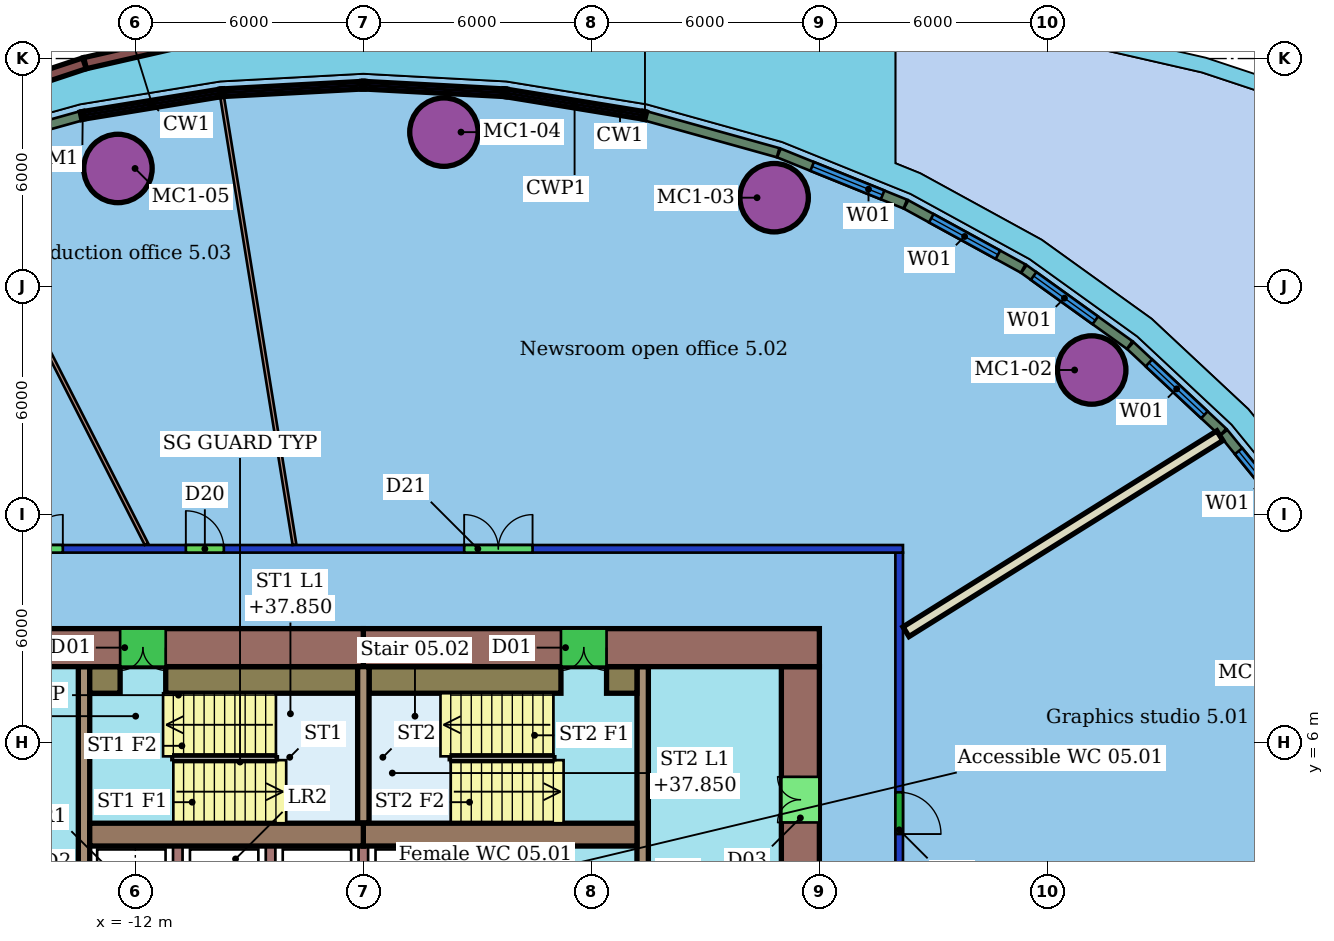
"""IFC4 building model, lengths in metres.
Left out: names, types, materials, properties, quantities, classifications, styles, units other than length and angle.
Written with IfcOpenShell. Run it as: python <this file> out.ifc"""

import sys

from ifc_helpers import new_model, si_unit, direction, frame, frame_2d, origin, origin_2d, place, context, subcontext, project, spatial, rectangle, hollow_circle, extrude, element, fill, save


model = new_model("IFC4")
c1 = context("Model", 3, precision=1e-05, world=origin(), true_north=direction((0.0, 1.0)))
c2 = subcontext(c1, "Body", "Model", "MODEL_VIEW")
j1 = project(units=[si_unit("LENGTHUNIT", "METRE"), si_unit("PLANEANGLEUNIT", "RADIAN")], contexts=[c1])
p1 = place(None, origin())
s1 = spatial("IfcSite", under=j1, at=p1, CompositionType="ELEMENT")
p2 = place(p1, origin())
s2 = spatial("IfcBuilding", under=s1, at=p2, CompositionType="ELEMENT")
p3 = place(p2, frame((0.0, 0.0, 36.0)))
s3 = spatial("IfcBuildingStorey", under=s2, at=p3, CompositionType="ELEMENT", Elevation=36.0)
for number, where, z_axis, x_axis in (
    (1, (13.166, 15.805, 0.0), (0.0, 0.0, 1.0), (1.0, 0.0, 0.0)),
    (2, (4.81, 20.339, 0.0), (0.0, 0.0, 1.0), (1.0, 0.0, 0.0)),
    (3, (-3.879, 22.064, 0.0), (0.0, 0.0, 1.0), (1.0, 0.0, 0.0)),
    (4, (-12.458, 21.108, 0.0), (0.0, 0.0, 1.0), (1.0, 0.0, 0.0)),
):
    element("IfcColumn", number, at=place(p3, frame(where, z_axis=z_axis, x_axis=x_axis)), inside=s3, PredefinedType="COLUMN", context=c2, shape_type="SweptSolid", body=[
        extrude(hollow_circle(Radius=0.9, WallThickness=0.06, at=origin_2d()), origin(), (0.0, 0.0, 1.0), 3.55),
    ])
p4 = place(p3, frame((-20.2, 11.1, 0.0), z_axis=(0.0, 0.0, 1.0), x_axis=(1.0, 0.0, 0.0)))
e5 = element("IfcWall", 5, at=p4, inside=s3, PredefinedType="PARTITIONING", context=c2, shape_type="SweptSolid", body=[
    extrude(rectangle(XDim=28.4, YDim=0.2, at=frame_2d((14.2, 0.0))), origin(), (0.0, 0.0, 1.0), 2.85),
])
p5 = place(p4, frame((16.853, 0.0, 0.0)))
e6 = element("IfcOpeningElement", 6, at=p5, cuts=e5, PredefinedType="OPENING", context=c2, shape_type="SweptSolid", body=[
    extrude(rectangle(XDim=1.8, YDim=2.1, at=frame_2d((0.9, 1.05))), frame((0.0, 0.11, 0.0), z_axis=(0.0, -1.0, 0.0), x_axis=(1.0, 0.0, 0.0)), (0.0, 0.0, 1.0), 0.22),
])
p6 = place(p4, frame((9.53, 0.0, 0.0)))
e7 = element("IfcOpeningElement", 7, at=p6, cuts=e5, PredefinedType="OPENING", context=c2, shape_type="SweptSolid", body=[
    extrude(rectangle(XDim=1.0, YDim=2.1, at=frame_2d((0.5, 1.05))), frame((0.0, 0.11, 0.0), z_axis=(0.0, -1.0, 0.0), x_axis=(1.0, 0.0, 0.0)), (0.0, 0.0, 1.0), 0.22),
])
p7 = place(p4, frame((4.492, 0.0, 0.0)))
e8 = element("IfcOpeningElement", 8, at=p7, cuts=e5, PredefinedType="OPENING", context=c2, shape_type="SweptSolid", body=[
    extrude(rectangle(XDim=1.8, YDim=2.1, at=frame_2d((0.9, 1.05))), frame((0.0, 0.11, 0.0), z_axis=(0.0, -1.0, 0.0), x_axis=(1.0, 0.0, 0.0)), (0.0, 0.0, 1.0), 0.22),
])
p8 = place(p3, frame((8.1, 11.0, 0.0), z_axis=(0.0, 0.0, 1.0), x_axis=(0.0, -1.0, 0.0)))
e9 = element("IfcWall", 9, at=p8, inside=s3, PredefinedType="PARTITIONING", context=c2, shape_type="SweptSolid", body=[
    extrude(rectangle(XDim=22.0, YDim=0.2, at=frame_2d((11.0, 0.0))), origin(), (0.0, 0.0, 1.0), 2.85),
])
p9 = place(p8, frame((6.305, 0.0, 0.0)))
e10 = element("IfcOpeningElement", 10, at=p9, cuts=e9, PredefinedType="OPENING", context=c2, shape_type="SweptSolid", body=[
    extrude(rectangle(XDim=1.1, YDim=2.1, at=frame_2d((0.55, 1.05))), frame((0.0, 0.11, 0.0), z_axis=(0.0, -1.0, 0.0), x_axis=(1.0, 0.0, 0.0)), (0.0, 0.0, 1.0), 0.22),
])
p10 = place(p8, frame((13.064, 0.0, 0.0)))
e11 = element("IfcOpeningElement", 11, at=p10, cuts=e9, PredefinedType="OPENING", context=c2, shape_type="SweptSolid", body=[
    extrude(rectangle(XDim=0.9, YDim=2.1, at=frame_2d((0.45, 1.05))), frame((0.0, 0.11, 0.0), z_axis=(0.0, -1.0, 0.0), x_axis=(1.0, 0.0, 0.0)), (0.0, 0.0, 1.0), 0.22),
])
p11 = place(p3, frame((22.134, 3.013, 0.0), z_axis=(0.0, 0.0, 1.0), x_axis=(-0.994314695198, -0.106481392334, 0.0)))
e12 = element("IfcWall", 12, at=p11, inside=s3, PredefinedType="PARTITIONING", context=c2, shape_type="SweptSolid", body=[
    extrude(rectangle(XDim=13.998, YDim=0.3, at=frame_2d((6.999, 0.0))), origin(), (0.0, 0.0, 1.0), 3.55),
])
p12 = place(p3, frame((16.538, 14.076, 0.0), z_axis=(0.0, 0.0, 1.0), x_axis=(-0.848172924514, -0.529719444726, 0.0)))
e13 = element("IfcWall", 13, at=p12, inside=s3, PredefinedType="PARTITIONING", context=c2, shape_type="SweptSolid", body=[
    extrude(rectangle(XDim=9.737, YDim=0.3, at=frame_2d((4.869, 0.0))), origin(), (0.0, 0.0, 1.0), 3.55),
])
p13 = place(p3, frame((-9.714, 22.976, 0.0), z_axis=(0.0, 0.0, 1.0), x_axis=(0.159567915993, -0.987186953006, 0.0)))
e14 = element("IfcWall", 14, at=p13, inside=s3, PredefinedType="PARTITIONING", context=c2, shape_type="SweptSolid", body=[
    extrude(rectangle(XDim=11.92, YDim=0.1, at=frame_2d((5.96, 0.0))), origin(), (0.0, 0.0, 1.0), 3.55),
])
p14 = place(p3, frame((-16.885, 21.401, 0.0), z_axis=(0.0, 0.0, 1.0), x_axis=(0.453334779339, -0.89134032661, 0.0)))
e15 = element("IfcWall", 15, at=p14, inside=s3, PredefinedType="PARTITIONING", context=c2, shape_type="SweptSolid", body=[
    extrude(rectangle(XDim=11.419, YDim=0.1, at=frame_2d((5.709, 0.0))), origin(), (0.0, 0.0, 1.0), 3.55),
])
p15 = place(p3, frame((18.688, 11.637, 0.0), z_axis=(0.0, 0.0, 1.0), x_axis=(-0.631970989947, 0.774992043743, 0.0)))
e16 = element("IfcWall", 16, at=p15, inside=s3, PredefinedType="SOLIDWALL", context=c2, shape_type="SweptSolid", body=[
    extrude(rectangle(XDim=3.245, YDim=0.25, at=frame_2d((1.623, 0.0))), origin(), (0.0, 0.0, 1.0), 3.15),
])
p16 = place(p15, frame((0.623, 0.0, 0.8)))
e17 = element("IfcOpeningElement", 17, at=p16, cuts=e16, PredefinedType="OPENING", context=c2, shape_type="SweptSolid", body=[
    extrude(rectangle(XDim=2.0, YDim=2.2, at=frame_2d((1.0, 1.1))), frame((0.0, 0.135, 0.0), z_axis=(0.0, -1.0, 0.0), x_axis=(1.0, 0.0, 0.0)), (0.0, 0.0, 1.0), 0.27),
])
p17 = place(p3, frame((16.621, 14.17, 0.0), z_axis=(0.0, 0.0, 1.0), x_axis=(-0.730670592597, 0.682730170063, 0.0)))
e18 = element("IfcWall", 18, at=p17, inside=s3, PredefinedType="SOLIDWALL", context=c2, shape_type="SweptSolid", body=[
    extrude(rectangle(XDim=3.336, YDim=0.25, at=frame_2d((1.668, 0.0))), origin(), (0.0, 0.0, 1.0), 3.15),
])
p18 = place(p17, frame((0.668, 0.0, 0.8)))
e19 = element("IfcOpeningElement", 19, at=p18, cuts=e18, PredefinedType="OPENING", context=c2, shape_type="SweptSolid", body=[
    extrude(rectangle(XDim=2.0, YDim=2.2, at=frame_2d((1.0, 1.1))), frame((0.0, 0.135, 0.0), z_axis=(0.0, -1.0, 0.0), x_axis=(1.0, 0.0, 0.0)), (0.0, 0.0, 1.0), 0.27),
])
p19 = place(p3, frame((14.165, 16.463, 0.0), z_axis=(0.0, 0.0, 1.0), x_axis=(-0.812059685452, 0.5835743888, 0.0)))
e20 = element("IfcWall", 20, at=p19, inside=s3, PredefinedType="SOLIDWALL", context=c2, shape_type="SweptSolid", body=[
    extrude(rectangle(XDim=3.427, YDim=0.25, at=frame_2d((1.713, 0.0))), origin(), (0.0, 0.0, 1.0), 3.15),
])
p20 = place(p19, frame((1.113, 0.0, 0.8)))
e21 = element("IfcOpeningElement", 21, at=p20, cuts=e20, PredefinedType="OPENING", context=c2, shape_type="SweptSolid", body=[
    extrude(rectangle(XDim=2.0, YDim=2.2, at=frame_2d((1.0, 1.1))), frame((0.0, 0.135, 0.0), z_axis=(0.0, -1.0, 0.0), x_axis=(1.0, 0.0, 0.0)), (0.0, 0.0, 1.0), 0.27),
])
p21 = place(p3, frame((11.362, 18.475, 0.0), z_axis=(0.0, 0.0, 1.0), x_axis=(-0.8771213679, 0.480268785134, 0.0)))
e22 = element("IfcWall", 22, at=p21, inside=s3, PredefinedType="SOLIDWALL", context=c2, shape_type="SweptSolid", body=[
    extrude(rectangle(XDim=3.512, YDim=0.25, at=frame_2d((1.756, 0.0))), origin(), (0.0, 0.0, 1.0), 3.15),
])
p22 = place(p21, frame((0.756, 0.0, 0.8)))
e23 = element("IfcOpeningElement", 23, at=p22, cuts=e22, PredefinedType="OPENING", context=c2, shape_type="SweptSolid", body=[
    extrude(rectangle(XDim=2.0, YDim=2.2, at=frame_2d((1.0, 1.1))), frame((0.0, 0.135, 0.0), z_axis=(0.0, -1.0, 0.0), x_axis=(1.0, 0.0, 0.0)), (0.0, 0.0, 1.0), 0.27),
])
p23 = place(p3, frame((8.261, 20.171, 0.0), z_axis=(0.0, 0.0, 1.0), x_axis=(-0.927147291409, 0.374697077694, 0.0)))
e24 = element("IfcWall", 24, at=p23, inside=s3, PredefinedType="SOLIDWALL", context=c2, shape_type="SweptSolid", body=[
    extrude(rectangle(XDim=3.588, YDim=0.25, at=frame_2d((1.794, 0.0))), origin(), (0.0, 0.0, 1.0), 3.15),
])
p24 = place(p23, frame((0.644, 0.0, 0.8)))
e25 = element("IfcOpeningElement", 25, at=p24, cuts=e24, PredefinedType="OPENING", context=c2, shape_type="SweptSolid", body=[
    extrude(rectangle(XDim=2.0, YDim=2.2, at=frame_2d((1.0, 1.1))), frame((0.0, 0.135, 0.0), z_axis=(0.0, -1.0, 0.0), x_axis=(1.0, 0.0, 0.0)), (0.0, 0.0, 1.0), 0.27),
])
for number, where, z_axis, x_axis in (
    (26, (4.914, 21.522, 0.0), (0.0, 0.0, 1.0), (-0.963, 0.268, 0.0)),
    (27, (-13.443, 22.488, 0.0), (0.0, 0.0, 1.0), (-0.963, -0.268, 0.0)),
):
    element("IfcWall", number, at=place(p3, frame(where, z_axis=z_axis, x_axis=x_axis)), inside=s3, PredefinedType="SOLIDWALL", context=c2, shape_type="SweptSolid", body=[
        extrude(rectangle(XDim=3.604, YDim=0.25, at=frame_2d((1.802, 0.0))), origin(), (0.0, 0.0, 1.0), 3.15),
    ])
p25 = place(p3, frame((-8.57, 24.965, 0.0), z_axis=(0.0, 0.0, 1.0), x_axis=(-0.974849806662, -0.222862860186, 0.0)))
e28 = element("IfcWall", 28, at=p25, inside=s3, PredefinedType="PARAPET", context=c2, shape_type="SweptSolid", body=[
    extrude(rectangle(XDim=4.877, YDim=0.3, at=frame_2d((2.438, 0.0))), origin(), (0.0, 0.0, 1.0), 1.1),
])
p26 = place(p3, frame((-13.338, 23.875, 0.0), z_axis=(0.0, 0.0, 1.0), x_axis=(-0.949007114017, -0.315254655071, 0.0)))
e29 = element("IfcWall", 29, at=p26, inside=s3, PredefinedType="PARAPET", context=c2, shape_type="SweptSolid", body=[
    extrude(rectangle(XDim=4.743, YDim=0.3, at=frame_2d((2.371, 0.0))), origin(), (0.0, 0.0, 1.0), 1.1),
])
p27 = place(p3, frame((6.0, 8.5, 0.0), z_axis=(0.0, 0.0, 1.0), x_axis=(-1.0, 0.0, 0.0)))
e30 = element("IfcWall", 30, at=p27, inside=s3, PredefinedType="SHEAR", context=c2, shape_type="SweptSolid", body=[
    extrude(rectangle(XDim=12.0, YDim=1.0, at=frame_2d((6.0, 0.0))), origin(), (0.0, 0.0, 1.0), 3.4),
])
p28 = place(p27, frame((5.6, 0.0, 0.0)))
e31 = element("IfcOpeningElement", 31, at=p28, cuts=e30, PredefinedType="OPENING", context=c2, shape_type="SweptSolid", body=[
    extrude(rectangle(XDim=1.2, YDim=2.1, at=frame_2d((0.6, 1.05))), frame((0.0, 0.51, 0.0), z_axis=(0.0, -1.0, 0.0), x_axis=(1.0, 0.0, 0.0)), (0.0, 0.0, 1.0), 1.02),
])
p29 = place(p3, frame((-6.0, 8.5, 0.0), z_axis=(0.0, 0.0, 1.0), x_axis=(-1.0, 0.0, 0.0)))
e32 = element("IfcWall", 32, at=p29, inside=s3, PredefinedType="SHEAR", context=c2, shape_type="SweptSolid", body=[
    extrude(rectangle(XDim=12.0, YDim=1.0, at=frame_2d((6.0, 0.0))), origin(), (0.0, 0.0, 1.0), 3.4),
])
p30 = place(p29, frame((5.2, 0.0, 0.0)))
e33 = element("IfcOpeningElement", 33, at=p30, cuts=e32, PredefinedType="OPENING", context=c2, shape_type="SweptSolid", body=[
    extrude(rectangle(XDim=1.2, YDim=2.1, at=frame_2d((0.6, 1.05))), frame((0.0, 0.51, 0.0), z_axis=(0.0, -1.0, 0.0), x_axis=(1.0, 0.0, 0.0)), (0.0, 0.0, 1.0), 1.02),
])
p31 = place(p3, frame((5.5, -8.0, 0.0), z_axis=(0.0, 0.0, 1.0), x_axis=(0.0, 1.0, 0.0)))
e34 = element("IfcWall", 34, at=p31, inside=s3, PredefinedType="SHEAR", context=c2, shape_type="SweptSolid", body=[
    extrude(rectangle(XDim=16.0, YDim=1.0, at=frame_2d((8.0, 0.0))), origin(), (0.0, 0.0, 1.0), 3.4),
])
p32 = place(p31, frame((2.9, 0.0, 0.0)))
e35 = element("IfcOpeningElement", 35, at=p32, cuts=e34, PredefinedType="OPENING", context=c2, shape_type="SweptSolid", body=[
    extrude(rectangle(XDim=1.2, YDim=2.1, at=frame_2d((0.6, 1.05))), frame((0.0, 0.51, 0.0), z_axis=(0.0, -1.0, 0.0), x_axis=(1.0, 0.0, 0.0)), (0.0, 0.0, 1.0), 1.02),
])
p33 = place(p31, frame((11.9, 0.0, 0.0)))
e36 = element("IfcOpeningElement", 36, at=p33, cuts=e34, PredefinedType="OPENING", context=c2, shape_type="SweptSolid", body=[
    extrude(rectangle(XDim=1.2, YDim=2.1, at=frame_2d((0.6, 1.05))), frame((0.0, 0.51, 0.0), z_axis=(0.0, -1.0, 0.0), x_axis=(1.0, 0.0, 0.0)), (0.0, 0.0, 1.0), 1.02),
])
for number, where, z_axis, x_axis in (
    (37, (-13.2, 3.58, 0.0), (0.0, 0.0, 1.0), (1.0, 0.0, 0.0)),
    (38, (-6.0, 3.58, 0.0), (0.0, 0.0, 1.0), (1.0, 0.0, 0.0)),
):
    element("IfcWall", number, at=place(p3, frame(where, z_axis=z_axis, x_axis=x_axis)), inside=s3, PredefinedType="SHEAR", context=c2, shape_type="SweptSolid", body=[
        extrude(rectangle(XDim=7.2, YDim=0.6, at=frame_2d((3.6, 0.0))), origin(), (0.0, 0.0, 1.0), 3.4),
    ])
p34 = place(p3, frame((-13.35, 8.0, 0.0), z_axis=(0.0, 0.0, 1.0), x_axis=(0.0, -1.0, 0.0)))
e39 = element("IfcWall", 39, at=p34, inside=s3, PredefinedType="SHEAR", context=c2, shape_type="SweptSolid", body=[
    extrude(rectangle(XDim=16.0, YDim=0.3, at=frame_2d((8.0, 0.0))), origin(), (0.0, 0.0, 1.0), 3.4),
])
p35 = place(p34, frame((7.25, 0.0, 0.0)))
e40 = element("IfcOpeningElement", 40, at=p35, cuts=e39, PredefinedType="OPENING", context=c2, shape_type="SweptSolid", body=[
    extrude(rectangle(XDim=1.5, YDim=2.1, at=frame_2d((0.75, 1.05))), frame((0.0, 0.16, 0.0), z_axis=(0.0, -1.0, 0.0), x_axis=(1.0, 0.0, 0.0)), (0.0, 0.0, 1.0), 0.32),
])
p36 = place(p3, frame((1.35, -8.0, 0.0), z_axis=(0.0, 0.0, 1.0), x_axis=(0.0, 1.0, 0.0)))
e41 = element("IfcWall", 41, at=p36, inside=s3, PredefinedType="SHEAR", context=c2, shape_type="SweptSolid", body=[
    extrude(rectangle(XDim=16.0, YDim=0.3, at=frame_2d((8.0, 0.0))), origin(), (0.0, 0.0, 1.0), 3.4),
])
p37 = place(p36, frame((1.91, 0.0, 0.0)))
e42 = element("IfcOpeningElement", 42, at=p37, cuts=e41, PredefinedType="OPENING", context=c2, shape_type="SweptSolid", body=[
    extrude(rectangle(XDim=1.0, YDim=2.1, at=frame_2d((0.5, 1.05))), frame((0.0, 0.16, 0.0), z_axis=(0.0, -1.0, 0.0), x_axis=(1.0, 0.0, 0.0)), (0.0, 0.0, 1.0), 0.32),
])
p38 = place(p36, frame((7.25, 0.0, 0.0)))
e43 = element("IfcOpeningElement", 43, at=p38, cuts=e41, PredefinedType="OPENING", context=c2, shape_type="SweptSolid", body=[
    extrude(rectangle(XDim=1.5, YDim=2.1, at=frame_2d((0.75, 1.05))), frame((0.0, 0.16, 0.0), z_axis=(0.0, -1.0, 0.0), x_axis=(1.0, 0.0, 0.0)), (0.0, 0.0, 1.0), 0.32),
])
p39 = place(p3, frame((-6.0, 3.88, 0.0), z_axis=(0.0, 0.0, 1.0), x_axis=(0.0, 1.0, 0.0)))
e44 = element("IfcWall", 44, at=p39, inside=s3, PredefinedType="SHEAR", context=c2, shape_type="SweptSolid", body=[
    extrude(rectangle(XDim=4.12, YDim=0.3, at=frame_2d((2.06, 0.0))), origin(), (0.0, 0.0, 1.0), 3.4),
])
p40 = place(p3, frame((-13.2, 7.65, 0.0), z_axis=(0.0, 0.0, 1.0), x_axis=(1.0, 0.0, 0.0)))
e45 = element("IfcWall", 45, at=p40, inside=s3, PredefinedType="SHEAR", context=c2, shape_type="SweptSolid", body=[
    extrude(rectangle(XDim=0.8, YDim=0.7, at=frame_2d((0.4, 0.0))), origin(), (0.0, 0.0, 1.0), 3.4),
])
for number, where, z_axis, x_axis in (
    (46, (-11.2, 7.65, 0.0), (0.0, 0.0, 1.0), (1.0, 0.0, 0.0)),
    (47, (-5.85, 7.65, 0.0), (0.0, 0.0, 1.0), (1.0, 0.0, 0.0)),
):
    element("IfcWall", number, at=place(p3, frame(where, z_axis=z_axis, x_axis=x_axis)), inside=s3, PredefinedType="SHEAR", context=c2, shape_type="SweptSolid", body=[
        extrude(rectangle(XDim=5.05, YDim=0.7, at=frame_2d((2.525, 0.0))), origin(), (0.0, 0.0, 1.0), 3.4),
    ])
p41 = place(p3, frame((0.4, 7.65, 0.0), z_axis=(0.0, 0.0, 1.0), x_axis=(1.0, 0.0, 0.0)))
e48 = element("IfcWall", 48, at=p41, inside=s3, PredefinedType="SHEAR", context=c2, shape_type="SweptSolid", body=[
    extrude(rectangle(XDim=0.8, YDim=0.7, at=frame_2d((0.4, 0.0))), origin(), (0.0, 0.0, 1.0), 3.4),
])
for number, where, z_axis, x_axis in (
    (49, (-10.883, 1.6, 0.0), (0.0, 0.0, 1.0), (0.0, 1.0, 0.0)),
    (50, (-8.442, 1.6, 0.0), (0.0, 0.0, 1.0), (0.0, 1.0, 0.0)),
    (51, (-6.0, 1.6, 0.0), (0.0, 0.0, 1.0), (0.0, 1.0, 0.0)),
    (52, (-3.558, 1.6, 0.0), (0.0, 0.0, 1.0), (0.0, 1.0, 0.0)),
):
    element("IfcWall", number, at=place(p3, frame(where, z_axis=z_axis, x_axis=x_axis)), inside=s3, PredefinedType="SHEAR", context=c2, shape_type="SweptSolid", body=[
        extrude(rectangle(XDim=1.68, YDim=0.25, at=frame_2d((0.84, 0.0))), origin(), (0.0, 0.0, 1.0), 3.4),
    ])
p42 = place(p3, frame((-1.765, 1.6, 0.0), z_axis=(0.0, 0.0, 1.0), x_axis=(0.0, 1.0, 0.0)))
e53 = element("IfcWall", 53, at=p42, inside=s3, PredefinedType="PARTITIONING", context=c2, shape_type="SweptSolid", body=[
    extrude(rectangle(XDim=1.68, YDim=0.15, at=frame_2d((0.84, 0.0))), origin(), (0.0, 0.0, 1.0), 3.4),
])
p43 = place(p9, origin())
e54 = element("IfcDoor", 54, at=p43, inside=s3, OperationType="SINGLE_SWING_RIGHT", PredefinedType="DOOR", context=c2, shape_type="SweptSolid", body=[
    extrude(rectangle(XDim=1.1, YDim=2.1, at=frame_2d((0.55, 1.05))), frame((0.0, 0.025, 0.0), z_axis=(0.0, -1.0, 0.0), x_axis=(1.0, 0.0, 0.0)), (0.0, 0.0, 1.0), 0.05),
])
fill(e10, e54)
p44 = place(p5, origin())
e55 = element("IfcDoor", 55, at=p44, inside=s3, OperationType="DOUBLE_DOOR_SINGLE_SWING", PredefinedType="DOOR", context=c2, shape_type="SweptSolid", body=[
    extrude(rectangle(XDim=1.8, YDim=2.1, at=frame_2d((0.9, 1.05))), frame((0.0, 0.025, 0.0), z_axis=(0.0, -1.0, 0.0), x_axis=(1.0, 0.0, 0.0)), (0.0, 0.0, 1.0), 0.05),
])
fill(e6, e55)
p45 = place(p6, origin())
e56 = element("IfcDoor", 56, at=p45, inside=s3, OperationType="SINGLE_SWING_LEFT", PredefinedType="DOOR", context=c2, shape_type="SweptSolid", body=[
    extrude(rectangle(XDim=1.0, YDim=2.1, at=frame_2d((0.5, 1.05))), frame((0.0, 0.025, 0.0), z_axis=(0.0, -1.0, 0.0), x_axis=(1.0, 0.0, 0.0)), (0.0, 0.0, 1.0), 0.05),
])
fill(e7, e56)
p46 = place(p7, origin())
e57 = element("IfcDoor", 57, at=p46, inside=s3, OperationType="DOUBLE_DOOR_SINGLE_SWING", PredefinedType="DOOR", context=c2, shape_type="SweptSolid", body=[
    extrude(rectangle(XDim=1.8, YDim=2.1, at=frame_2d((0.9, 1.05))), frame((0.0, 0.025, 0.0), z_axis=(0.0, -1.0, 0.0), x_axis=(1.0, 0.0, 0.0)), (0.0, 0.0, 1.0), 0.05),
])
fill(e8, e57)
p47 = place(p16, origin())
e58 = element("IfcWindow", 58, at=p47, inside=s3, PartitioningType="SINGLE_PANEL", PredefinedType="WINDOW", context=c2, shape_type="SweptSolid", body=[
    extrude(rectangle(XDim=2.0, YDim=2.2, at=frame_2d((1.0, 1.1))), frame((0.0, 0.03, 0.0), z_axis=(0.0, -1.0, 0.0), x_axis=(1.0, 0.0, 0.0)), (0.0, 0.0, 1.0), 0.06),
])
fill(e17, e58)
p48 = place(p18, origin())
e59 = element("IfcWindow", 59, at=p48, inside=s3, PartitioningType="SINGLE_PANEL", PredefinedType="WINDOW", context=c2, shape_type="SweptSolid", body=[
    extrude(rectangle(XDim=2.0, YDim=2.2, at=frame_2d((1.0, 1.1))), frame((0.0, 0.03, 0.0), z_axis=(0.0, -1.0, 0.0), x_axis=(1.0, 0.0, 0.0)), (0.0, 0.0, 1.0), 0.06),
])
fill(e19, e59)
p49 = place(p20, origin())
e60 = element("IfcWindow", 60, at=p49, inside=s3, PartitioningType="SINGLE_PANEL", PredefinedType="WINDOW", context=c2, shape_type="SweptSolid", body=[
    extrude(rectangle(XDim=2.0, YDim=2.2, at=frame_2d((1.0, 1.1))), frame((0.0, 0.03, 0.0), z_axis=(0.0, -1.0, 0.0), x_axis=(1.0, 0.0, 0.0)), (0.0, 0.0, 1.0), 0.06),
])
fill(e21, e60)
p50 = place(p22, origin())
e61 = element("IfcWindow", 61, at=p50, inside=s3, PartitioningType="SINGLE_PANEL", PredefinedType="WINDOW", context=c2, shape_type="SweptSolid", body=[
    extrude(rectangle(XDim=2.0, YDim=2.2, at=frame_2d((1.0, 1.1))), frame((0.0, 0.03, 0.0), z_axis=(0.0, -1.0, 0.0), x_axis=(1.0, 0.0, 0.0)), (0.0, 0.0, 1.0), 0.06),
])
fill(e23, e61)
p51 = place(p24, origin())
e62 = element("IfcWindow", 62, at=p51, inside=s3, PartitioningType="SINGLE_PANEL", PredefinedType="WINDOW", context=c2, shape_type="SweptSolid", body=[
    extrude(rectangle(XDim=2.0, YDim=2.2, at=frame_2d((1.0, 1.1))), frame((0.0, 0.03, 0.0), z_axis=(0.0, -1.0, 0.0), x_axis=(1.0, 0.0, 0.0)), (0.0, 0.0, 1.0), 0.06),
])
fill(e25, e62)
p52 = place(p28, origin())
e63 = element("IfcDoor", 63, at=p52, inside=s3, OperationType="DOUBLE_DOOR_SINGLE_SWING", PredefinedType="NOTDEFINED", context=c2, shape_type="SweptSolid", body=[
    extrude(rectangle(XDim=1.2, YDim=2.1, at=frame_2d((0.6, 1.05))), frame((0.0, 0.025, 0.0), z_axis=(0.0, -1.0, 0.0), x_axis=(1.0, 0.0, 0.0)), (0.0, 0.0, 1.0), 0.05),
])
fill(e31, e63)
p53 = place(p30, origin())
e64 = element("IfcDoor", 64, at=p53, inside=s3, OperationType="DOUBLE_DOOR_SINGLE_SWING", PredefinedType="NOTDEFINED", context=c2, shape_type="SweptSolid", body=[
    extrude(rectangle(XDim=1.2, YDim=2.1, at=frame_2d((0.6, 1.05))), frame((0.0, 0.025, 0.0), z_axis=(0.0, -1.0, 0.0), x_axis=(1.0, 0.0, 0.0)), (0.0, 0.0, 1.0), 0.05),
])
fill(e33, e64)
p54 = place(p33, origin())
e65 = element("IfcDoor", 65, at=p54, inside=s3, OperationType="DOUBLE_DOOR_SINGLE_SWING", PredefinedType="NOTDEFINED", context=c2, shape_type="SweptSolid", body=[
    extrude(rectangle(XDim=1.2, YDim=2.1, at=frame_2d((0.6, 1.05))), frame((0.0, 0.025, 0.0), z_axis=(0.0, -1.0, 0.0), x_axis=(1.0, 0.0, 0.0)), (0.0, 0.0, 1.0), 0.05),
])
fill(e36, e65)
save(model, sys.argv[1])
